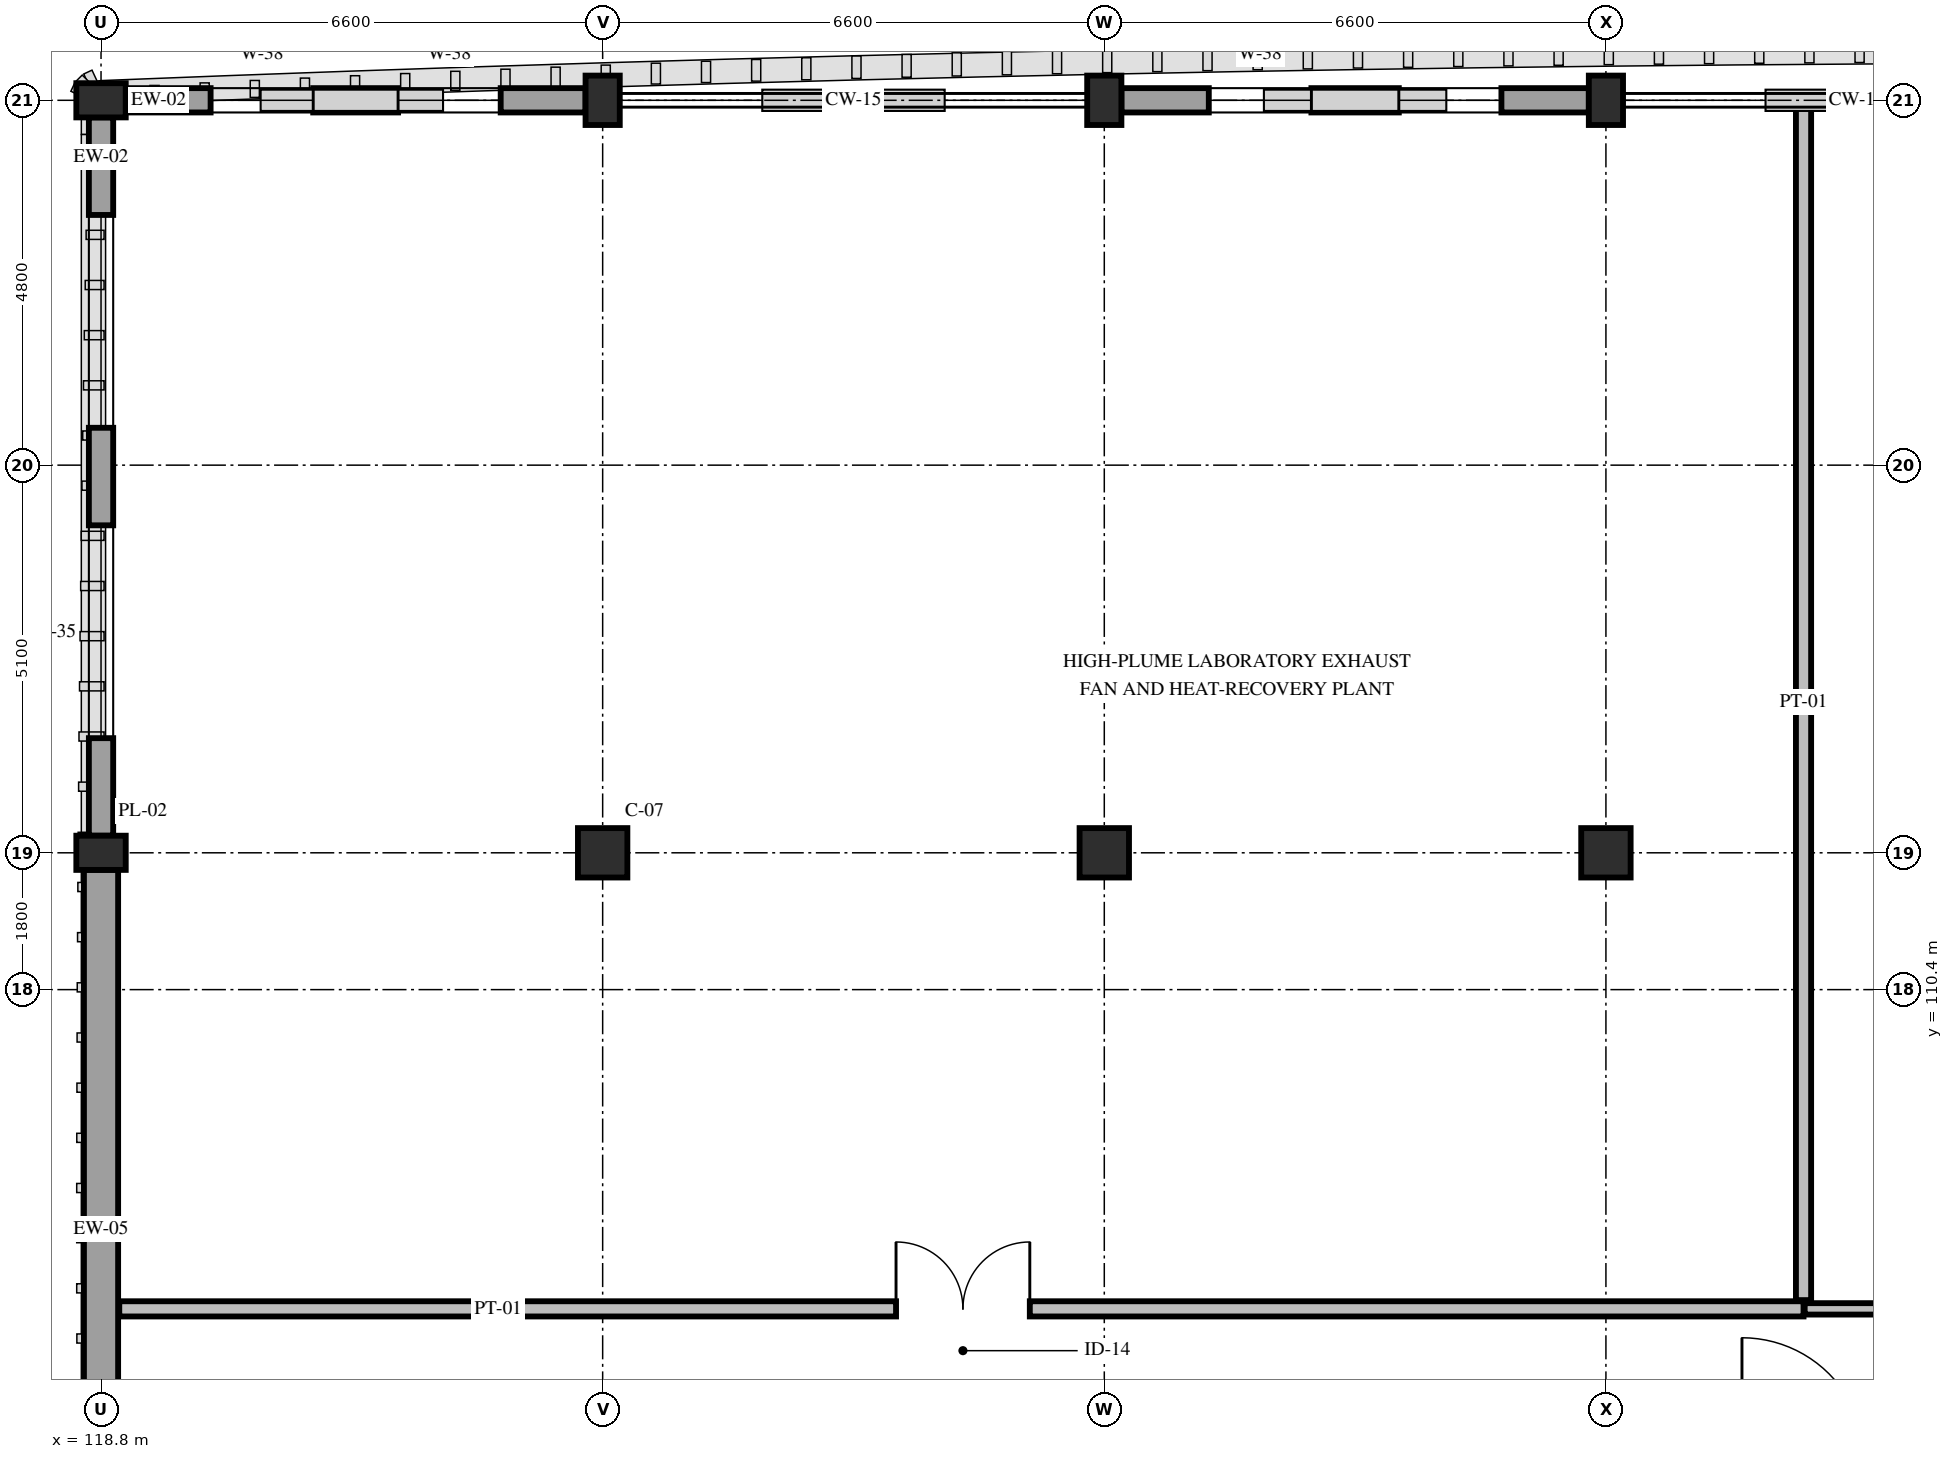
"""IFC4 building model, lengths in metres.
Left out: names, types, materials, properties, quantities, classifications, styles, units other than length and angle.
Written with IfcOpenShell. Run it as: python <this file> out.ifc"""

import sys

from ifc_helpers import new_model, si_unit, direction, frame, frame_2d, origin, origin_2d, place, context, subcontext, project, spatial, rectangle, extrude, element, fill, save


model = new_model("IFC4")
c1 = context("Model", 3, precision=1e-05, world=origin(), true_north=direction((0.0, 1.0)))
c2 = subcontext(c1, "Body", "Model", "MODEL_VIEW")
j1 = project(units=[si_unit("LENGTHUNIT", "METRE"), si_unit("PLANEANGLEUNIT", "RADIAN")], contexts=[c1])
p1 = place(None, origin())
s1 = spatial("IfcSite", under=j1, at=p1, CompositionType="ELEMENT")
p2 = place(p1, origin())
s2 = spatial("IfcBuilding", under=s1, at=p2, CompositionType="ELEMENT")
p3 = place(p2, frame((0.0, 0.0, 29.4)))
s3 = spatial("IfcBuildingStorey", under=s2, at=p3, CompositionType="ELEMENT", Elevation=29.4)
for number, where, z_axis, x_axis in (
    (1, (118.8, 112.2, 0.0), (0.0, 0.0, 1.0), (0.0, 1.0, 0.0)),
    (2, (118.8, 122.1, 0.0), (0.0, 0.0, 1.0), (0.0, 1.0, 0.0)),
):
    element("IfcColumn", number, at=place(p3, frame(where, z_axis=z_axis, x_axis=x_axis)), inside=s3, PredefinedType="PILASTER", context=c2, shape_type="SweptSolid", body=[
        extrude(rectangle(XDim=0.45, YDim=0.65, at=origin_2d()), origin(), (0.0, 0.0, 1.0), 4.8),
    ])
p4 = place(p3, frame((125.4, 112.2, 0.0), z_axis=(0.0, 0.0, 1.0), x_axis=(1.0, 0.0, 0.0)))
e3 = element("IfcColumn", 3, at=p4, inside=s3, PredefinedType="COLUMN", context=c2, shape_type="SweptSolid", body=[
    extrude(rectangle(XDim=0.65, YDim=0.65, at=origin_2d()), origin(), (0.0, 0.0, 1.0), 4.8),
])
p5 = place(p3, frame((125.4, 122.1, 0.0), z_axis=(0.0, 0.0, 1.0), x_axis=(1.0, 0.0, 0.0)))
e4 = element("IfcColumn", 4, at=p5, inside=s3, PredefinedType="PILASTER", context=c2, shape_type="SweptSolid", body=[
    extrude(rectangle(XDim=0.45, YDim=0.65, at=origin_2d()), origin(), (0.0, 0.0, 1.0), 4.8),
])
p6 = place(p3, frame((132.0, 112.2, 0.0), z_axis=(0.0, 0.0, 1.0), x_axis=(1.0, 0.0, 0.0)))
e5 = element("IfcColumn", 5, at=p6, inside=s3, PredefinedType="COLUMN", context=c2, shape_type="SweptSolid", body=[
    extrude(rectangle(XDim=0.65, YDim=0.65, at=origin_2d()), origin(), (0.0, 0.0, 1.0), 4.8),
])
p7 = place(p3, frame((132.0, 122.1, 0.0), z_axis=(0.0, 0.0, 1.0), x_axis=(1.0, 0.0, 0.0)))
e6 = element("IfcColumn", 6, at=p7, inside=s3, PredefinedType="PILASTER", context=c2, shape_type="SweptSolid", body=[
    extrude(rectangle(XDim=0.45, YDim=0.65, at=origin_2d()), origin(), (0.0, 0.0, 1.0), 4.8),
])
p8 = place(p3, frame((138.6, 112.2, 0.0), z_axis=(0.0, 0.0, 1.0), x_axis=(1.0, 0.0, 0.0)))
e7 = element("IfcColumn", 7, at=p8, inside=s3, PredefinedType="COLUMN", context=c2, shape_type="SweptSolid", body=[
    extrude(rectangle(XDim=0.65, YDim=0.65, at=origin_2d()), origin(), (0.0, 0.0, 1.0), 4.8),
])
p9 = place(p3, frame((138.6, 122.1, 0.0), z_axis=(0.0, 0.0, 1.0), x_axis=(1.0, 0.0, 0.0)))
e8 = element("IfcColumn", 8, at=p9, inside=s3, PredefinedType="PILASTER", context=c2, shape_type="SweptSolid", body=[
    extrude(rectangle(XDim=0.45, YDim=0.65, at=origin_2d()), origin(), (0.0, 0.0, 1.0), 4.8),
])
p10 = place(p3, frame((118.8, 102.525, 0.0), z_axis=(0.0, 0.0, 1.0), x_axis=(0.0, 1.0, 0.0)))
e9 = element("IfcWall", 9, at=p10, inside=s3, PredefinedType="SOLIDWALL", context=c2, shape_type="SweptSolid", body=[
    extrude(rectangle(XDim=9.45, YDim=0.45, at=frame_2d((4.725, 0.0))), origin(), (0.0, 0.0, 1.0), 3.95),
])
p11 = place(p3, frame((118.8, 112.425, 0.0), z_axis=(0.0, 0.0, 1.0), x_axis=(0.0, 1.0, 0.0)))
e10 = element("IfcWall", 10, at=p11, inside=s3, PredefinedType="STANDARD", context=c2, shape_type="SweptSolid", body=[
    extrude(rectangle(XDim=9.45, YDim=0.32, at=frame_2d((4.725, 0.0))), origin(), (0.0, 0.0, 1.0), 3.95),
])
p12 = place(p11, frame((1.283, 0.0, 0.85)))
e11 = element("IfcOpeningElement", 11, at=p12, cuts=e10, PredefinedType="OPENING", context=c2, shape_type="SweptSolid", body=[
    extrude(rectangle(XDim=2.8, YDim=1.88, at=frame_2d((1.4, 0.94))), frame((0.0, 0.175, 0.0), z_axis=(0.0, -1.0, 0.0), x_axis=(1.0, 0.0, 0.0)), (0.0, 0.0, 1.0), 0.35),
])
p13 = place(p11, frame((5.367, 0.0, 0.85)))
e12 = element("IfcOpeningElement", 12, at=p13, cuts=e10, PredefinedType="OPENING", context=c2, shape_type="SweptSolid", body=[
    extrude(rectangle(XDim=2.8, YDim=1.88, at=frame_2d((1.4, 0.94))), frame((0.0, 0.175, 0.0), z_axis=(0.0, -1.0, 0.0), x_axis=(1.0, 0.0, 0.0)), (0.0, 0.0, 1.0), 0.35),
])
p14 = place(p3, frame((119.125, 122.1, 0.0), z_axis=(0.0, 0.0, 1.0), x_axis=(1.0, 0.0, 0.0)))
e13 = element("IfcWall", 13, at=p14, inside=s3, PredefinedType="STANDARD", context=c2, shape_type="SweptSolid", body=[
    extrude(rectangle(XDim=6.05, YDim=0.32, at=frame_2d((3.025, 0.0))), origin(), (0.0, 0.0, 1.0), 3.78),
])
p15 = place(p14, frame((1.117, 0.0, 0.85)))
e14 = element("IfcOpeningElement", 14, at=p15, cuts=e13, PredefinedType="OPENING", context=c2, shape_type="SweptSolid", body=[
    extrude(rectangle(XDim=1.35, YDim=2.08, at=frame_2d((0.675, 1.04))), frame((0.0, 0.175, 0.0), z_axis=(0.0, -1.0, 0.0), x_axis=(1.0, 0.0, 0.0)), (0.0, 0.0, 1.0), 0.35),
])
p16 = place(p14, frame((3.583, 0.0, 0.85)))
e15 = element("IfcOpeningElement", 15, at=p16, cuts=e13, PredefinedType="OPENING", context=c2, shape_type="SweptSolid", body=[
    extrude(rectangle(XDim=1.35, YDim=2.08, at=frame_2d((0.675, 1.04))), frame((0.0, 0.175, 0.0), z_axis=(0.0, -1.0, 0.0), x_axis=(1.0, 0.0, 0.0)), (0.0, 0.0, 1.0), 0.35),
])
p17 = place(p3, frame((132.225, 122.1, 0.0), z_axis=(0.0, 0.0, 1.0), x_axis=(1.0, 0.0, 0.0)))
e16 = element("IfcWall", 16, at=p17, inside=s3, PredefinedType="STANDARD", context=c2, shape_type="SweptSolid", body=[
    extrude(rectangle(XDim=6.15, YDim=0.32, at=frame_2d((3.075, 0.0))), origin(), (0.0, 0.0, 1.0), 3.78),
])
p18 = place(p17, frame((1.15, 0.0, 0.85)))
e17 = element("IfcOpeningElement", 17, at=p18, cuts=e16, PredefinedType="OPENING", context=c2, shape_type="SweptSolid", body=[
    extrude(rectangle(XDim=1.35, YDim=2.08, at=frame_2d((0.675, 1.04))), frame((0.0, 0.175, 0.0), z_axis=(0.0, -1.0, 0.0), x_axis=(1.0, 0.0, 0.0)), (0.0, 0.0, 1.0), 0.35),
])
p19 = place(p17, frame((3.65, 0.0, 0.85)))
e18 = element("IfcOpeningElement", 18, at=p19, cuts=e16, PredefinedType="OPENING", context=c2, shape_type="SweptSolid", body=[
    extrude(rectangle(XDim=1.35, YDim=2.08, at=frame_2d((0.675, 1.04))), frame((0.0, 0.175, 0.0), z_axis=(0.0, -1.0, 0.0), x_axis=(1.0, 0.0, 0.0)), (0.0, 0.0, 1.0), 0.35),
])
p20 = place(p3, frame((119.04, 106.2, 0.0), z_axis=(0.0, 0.0, 1.0), x_axis=(1.0, 0.0, 0.0)))
e19 = element("IfcWall", 19, at=p20, inside=s3, PredefinedType="PARTITIONING", context=c2, shape_type="SweptSolid", body=[
    extrude(rectangle(XDim=22.16, YDim=0.2, at=frame_2d((11.08, 0.0))), origin(), (0.0, 0.0, 1.0), 3.78),
])
p21 = place(p20, frame((10.22, 0.0, 0.0)))
e20 = element("IfcOpeningElement", 20, at=p21, cuts=e19, PredefinedType="OPENING", context=c2, shape_type="SweptSolid", body=[
    extrude(rectangle(XDim=1.76, YDim=2.35, at=frame_2d((0.88, 1.175))), frame((0.0, 0.115, 0.0), z_axis=(0.0, -1.0, 0.0), x_axis=(1.0, 0.0, 0.0)), (0.0, 0.0, 1.0), 0.23),
])
p22 = place(p3, frame((141.2, 106.315, 0.0), z_axis=(0.0, 0.0, 1.0), x_axis=(0.0, 1.0, 0.0)))
e21 = element("IfcWall", 21, at=p22, inside=s3, PredefinedType="PARTITIONING", context=c2, shape_type="SweptSolid", body=[
    extrude(rectangle(XDim=15.745, YDim=0.2, at=frame_2d((7.873, 0.0))), origin(), (0.0, 0.0, 1.0), 3.93),
])
p23 = place(p3, frame((141.215, 106.2, 0.0), z_axis=(0.0, 0.0, 1.0), x_axis=(1.0, 0.0, 0.0)))
e22 = element("IfcWall", 22, at=p23, inside=s3, PredefinedType="PARTITIONING", context=c2, shape_type="SweptSolid", body=[
    extrude(rectangle(XDim=23.785, YDim=0.15, at=frame_2d((11.893, 0.0))), origin(), (0.0, 0.0, 1.0), 3.78),
])
p24 = place(p23, frame((11.355, 0.0, 0.0)))
e23 = element("IfcOpeningElement", 23, at=p24, cuts=e22, PredefinedType="OPENING", context=c2, shape_type="SweptSolid", body=[
    extrude(rectangle(XDim=1.56, YDim=2.3, at=frame_2d((0.78, 1.15))), frame((0.0, 0.09, 0.0), z_axis=(0.0, -1.0, 0.0), x_axis=(1.0, 0.0, 0.0)), (0.0, 0.0, 1.0), 0.18),
])
p25 = place(p12, origin())
e24 = element("IfcWindow", 24, at=p25, inside=s3, PartitioningType="DOUBLE_PANEL_VERTICAL", PredefinedType="WINDOW", context=c2, shape_type="SweptSolid", body=[
    extrude(rectangle(XDim=2.8, YDim=1.88, at=frame_2d((1.4, 0.94))), frame((0.0, 0.03, 0.0), z_axis=(0.0, -1.0, 0.0), x_axis=(1.0, 0.0, 0.0)), (0.0, 0.0, 1.0), 0.06),
])
fill(e11, e24)
p26 = place(p13, origin())
e25 = element("IfcWindow", 25, at=p26, inside=s3, PartitioningType="DOUBLE_PANEL_VERTICAL", PredefinedType="WINDOW", context=c2, shape_type="SweptSolid", body=[
    extrude(rectangle(XDim=2.8, YDim=1.88, at=frame_2d((1.4, 0.94))), frame((0.0, 0.03, 0.0), z_axis=(0.0, -1.0, 0.0), x_axis=(1.0, 0.0, 0.0)), (0.0, 0.0, 1.0), 0.06),
])
fill(e12, e25)
p27 = place(p15, origin())
e26 = element("IfcWindow", 26, at=p27, inside=s3, PartitioningType="SINGLE_PANEL", PredefinedType="WINDOW", context=c2, shape_type="SweptSolid", body=[
    extrude(rectangle(XDim=1.35, YDim=2.08, at=frame_2d((0.675, 1.04))), frame((0.0, 0.03, 0.0), z_axis=(0.0, -1.0, 0.0), x_axis=(1.0, 0.0, 0.0)), (0.0, 0.0, 1.0), 0.06),
])
fill(e14, e26)
p28 = place(p16, origin())
e27 = element("IfcWindow", 27, at=p28, inside=s3, PartitioningType="SINGLE_PANEL", PredefinedType="WINDOW", context=c2, shape_type="SweptSolid", body=[
    extrude(rectangle(XDim=1.35, YDim=2.08, at=frame_2d((0.675, 1.04))), frame((0.0, 0.03, 0.0), z_axis=(0.0, -1.0, 0.0), x_axis=(1.0, 0.0, 0.0)), (0.0, 0.0, 1.0), 0.06),
])
fill(e15, e27)
p29 = place(p18, origin())
e28 = element("IfcWindow", 28, at=p29, inside=s3, PartitioningType="SINGLE_PANEL", PredefinedType="WINDOW", context=c2, shape_type="SweptSolid", body=[
    extrude(rectangle(XDim=1.35, YDim=2.08, at=frame_2d((0.675, 1.04))), frame((0.0, 0.03, 0.0), z_axis=(0.0, -1.0, 0.0), x_axis=(1.0, 0.0, 0.0)), (0.0, 0.0, 1.0), 0.06),
])
fill(e17, e28)
p30 = place(p19, origin())
e29 = element("IfcWindow", 29, at=p30, inside=s3, PartitioningType="SINGLE_PANEL", PredefinedType="WINDOW", context=c2, shape_type="SweptSolid", body=[
    extrude(rectangle(XDim=1.35, YDim=2.08, at=frame_2d((0.675, 1.04))), frame((0.0, 0.03, 0.0), z_axis=(0.0, -1.0, 0.0), x_axis=(1.0, 0.0, 0.0)), (0.0, 0.0, 1.0), 0.06),
])
fill(e18, e29)
p31 = place(p21, origin())
e30 = element("IfcDoor", 30, at=p31, inside=s3, OperationType="DOUBLE_DOOR_SINGLE_SWING", PredefinedType="DOOR", context=c2, shape_type="SweptSolid", body=[
    extrude(rectangle(XDim=1.76, YDim=2.35, at=frame_2d((0.88, 1.175))), frame((0.0, 0.025, 0.0), z_axis=(0.0, -1.0, 0.0), x_axis=(1.0, 0.0, 0.0)), (0.0, 0.0, 1.0), 0.05),
])
fill(e20, e30)
save(model, sys.argv[1])
